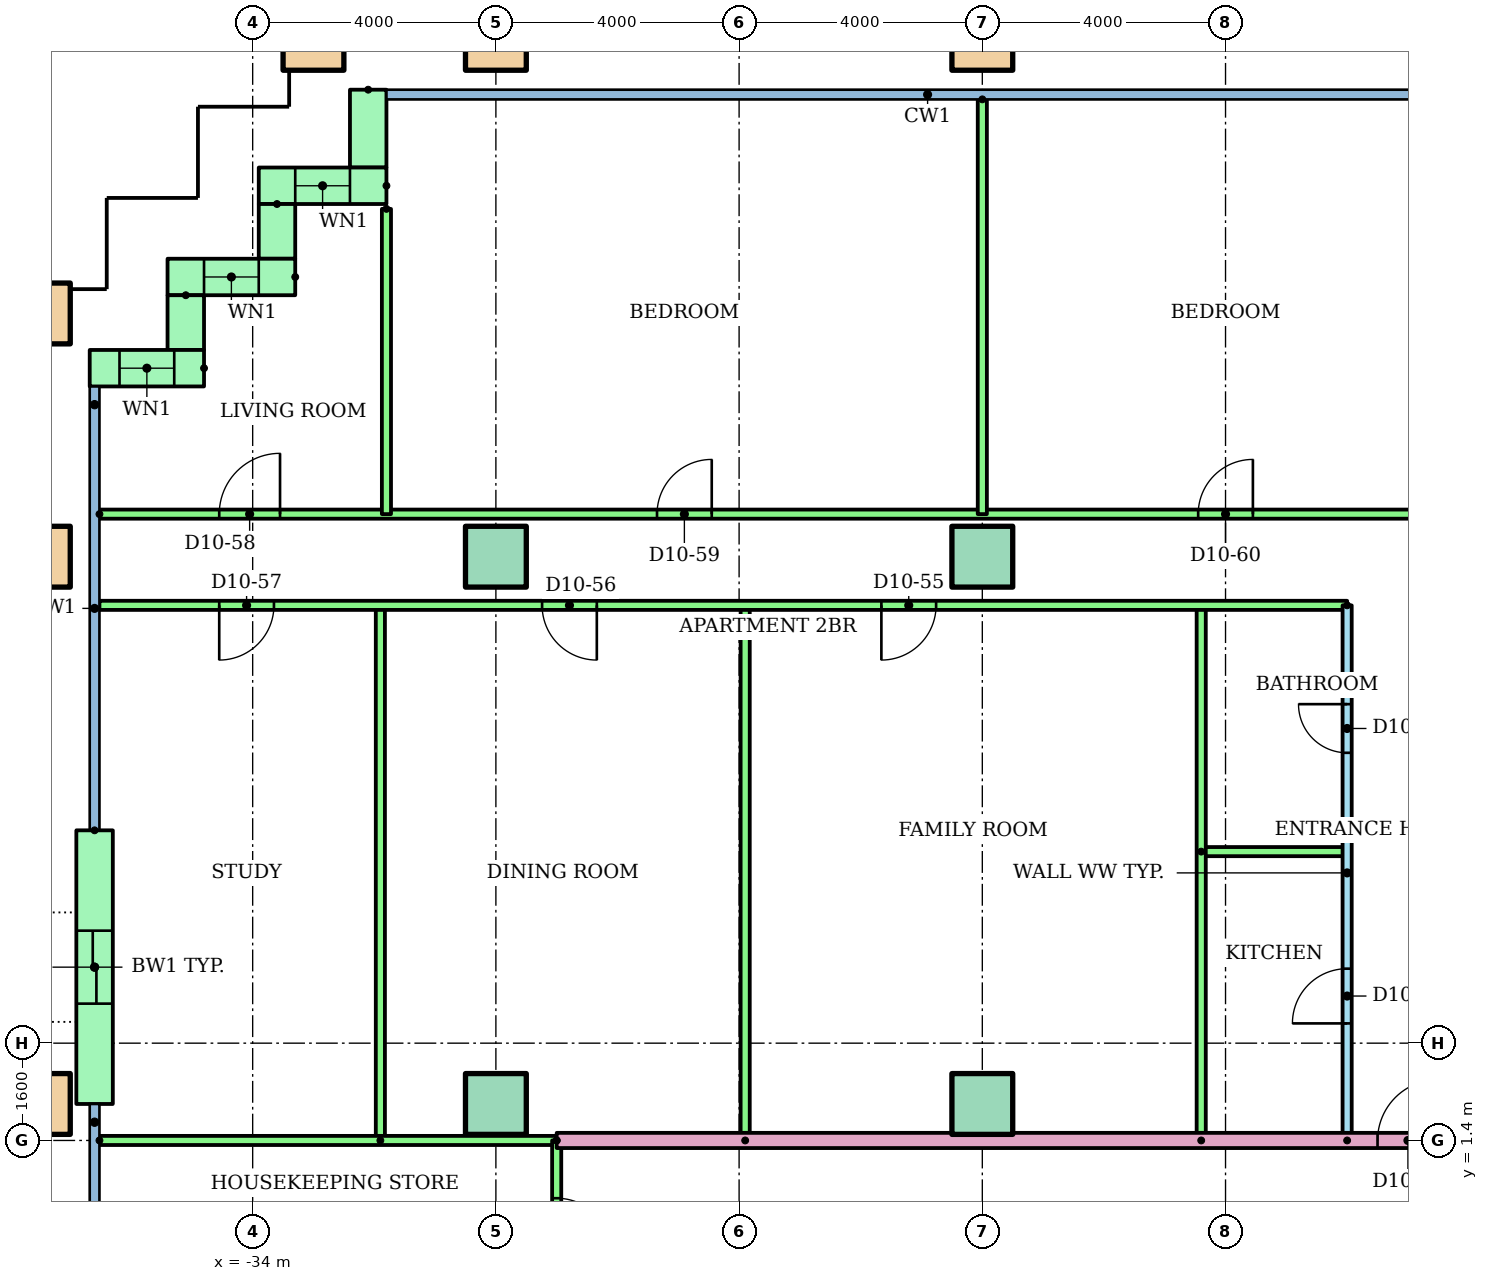
"""IFC4 building model, lengths in metres.
Left out: names, types, materials, properties, quantities, classifications, styles, units other than length and angle.
Written with IfcOpenShell. Run it as: python <this file> out.ifc"""

import sys

from ifc_helpers import new_model, si_unit, direction, frame, frame_2d, origin, origin_2d, place, context, subcontext, project, spatial, rectangle, hollow_rectangle, extrude, element, fill, save


model = new_model("IFC4")
c1 = context("Model", 3, precision=1e-05, world=origin(), true_north=direction((0.0, 1.0)))
c2 = subcontext(c1, "Body", "Model", "MODEL_VIEW")
j1 = project(units=[si_unit("LENGTHUNIT", "METRE"), si_unit("PLANEANGLEUNIT", "RADIAN")], contexts=[c1])
p1 = place(None, origin())
s1 = spatial("IfcSite", under=j1, at=p1, CompositionType="ELEMENT")
p2 = place(p1, origin())
s2 = spatial("IfcBuilding", under=s1, at=p2, CompositionType="ELEMENT")
p3 = place(p2, frame((0.0, 0.0, 41.6)))
s3 = spatial("IfcBuildingStorey", under=s2, at=p3, CompositionType="ELEMENT", Elevation=41.6)
p4 = place(p3, frame((-37.5, 2.0, 0.0)))
e1 = element("IfcColumn", 1, at=p4, inside=s3, PredefinedType="COLUMN", context=c2, shape_type="SweptSolid", body=[
    extrude(hollow_rectangle(XDim=1.0, YDim=1.0, WallThickness=0.05, at=origin_2d()), origin(), (0.0, 0.0, 1.0), 3.2),
])
for number, where in (
    (2, (-30.0, 2.0, 0.0)),
    (3, (-22.0, 2.0, 0.0)),
):
    element("IfcColumn", number, at=place(p3, frame(where)), inside=s3, PredefinedType="COLUMN", context=c2, shape_type="SweptSolid", body=[
        extrude(rectangle(XDim=1.0, YDim=1.0, at=origin_2d()), origin(), (0.0, 0.0, 1.0), 3.2),
    ])
p5 = place(p3, frame((-37.5, 11.0, 0.0)))
e4 = element("IfcColumn", 4, at=p5, inside=s3, PredefinedType="COLUMN", context=c2, shape_type="SweptSolid", body=[
    extrude(hollow_rectangle(XDim=1.0, YDim=1.0, WallThickness=0.05, at=origin_2d()), origin(), (0.0, 0.0, 1.0), 3.2),
])
for number, where in (
    (5, (-30.0, 11.0, 0.0)),
    (6, (-22.0, 11.0, 0.0)),
):
    element("IfcColumn", number, at=place(p3, frame(where)), inside=s3, PredefinedType="COLUMN", context=c2, shape_type="SweptSolid", body=[
        extrude(rectangle(XDim=1.0, YDim=1.0, at=origin_2d()), origin(), (0.0, 0.0, 1.0), 3.2),
    ])
for number, where in (
    (7, (-37.5, 15.0, 0.0)),
    (8, (-33.0, 19.5, 0.0)),
    (9, (-30.0, 19.5, 0.0)),
    (10, (-22.0, 19.5, 0.0)),
):
    element("IfcColumn", number, at=place(p3, frame(where)), inside=s3, PredefinedType="COLUMN", context=c2, shape_type="SweptSolid", body=[
        extrude(hollow_rectangle(XDim=1.0, YDim=1.0, WallThickness=0.05, at=origin_2d()), origin(), (0.0, 0.0, 1.0), 3.2),
    ])
p6 = place(p3, frame((-32.1, 18.68, 0.0), z_axis=(0.0, 0.0, 1.0), x_axis=(0.0, -1.0, 0.0)))
e11 = element("IfcWall", 11, at=p6, inside=s3, PredefinedType="STANDARD", context=c2, shape_type="SweptSolid", body=[
    extrude(rectangle(XDim=1.28, YDim=0.6, at=frame_2d((0.64, 0.0))), origin(), (0.0, 0.0, 1.0), 2.92),
])
p7 = place(p3, frame((-31.8, 17.1, 0.0), z_axis=(0.0, 0.0, 1.0), x_axis=(-1.0, 0.0, 0.0)))
e12 = element("IfcWall", 12, at=p7, inside=s3, PredefinedType="STANDARD", context=c2, shape_type="SweptSolid", body=[
    extrude(rectangle(XDim=2.1, YDim=0.6, at=frame_2d((1.05, 0.0))), origin(), (0.0, 0.0, 1.0), 2.92),
])
p8 = place(p7, frame((0.6, 0.0, 0.9)))
e13 = element("IfcOpeningElement", 13, at=p8, cuts=e12, PredefinedType="OPENING", context=c2, shape_type="SweptSolid", body=[
    extrude(rectangle(XDim=0.9, YDim=1.5, at=frame_2d((0.45, 0.75))), frame((0.0, 0.31, 0.0), z_axis=(0.0, -1.0, 0.0), x_axis=(1.0, 0.0, 0.0)), (0.0, 0.0, 1.0), 0.62),
])
p9 = place(p3, frame((-33.6, 16.8, 0.0), z_axis=(0.0, 0.0, 1.0), x_axis=(0.0, -1.0, 0.0)))
e14 = element("IfcWall", 14, at=p9, inside=s3, PredefinedType="STANDARD", context=c2, shape_type="SweptSolid", body=[
    extrude(rectangle(XDim=0.9, YDim=0.6, at=frame_2d((0.45, 0.0))), origin(), (0.0, 0.0, 1.0), 2.92),
])
p10 = place(p3, frame((-33.3, 15.6, 0.0), z_axis=(0.0, 0.0, 1.0), x_axis=(-1.0, 0.0, 0.0)))
e15 = element("IfcWall", 15, at=p10, inside=s3, PredefinedType="STANDARD", context=c2, shape_type="SweptSolid", body=[
    extrude(rectangle(XDim=2.1, YDim=0.6, at=frame_2d((1.05, 0.0))), origin(), (0.0, 0.0, 1.0), 2.92),
])
p11 = place(p10, frame((0.6, 0.0, 0.9)))
e16 = element("IfcOpeningElement", 16, at=p11, cuts=e15, PredefinedType="OPENING", context=c2, shape_type="SweptSolid", body=[
    extrude(rectangle(XDim=0.9, YDim=1.5, at=frame_2d((0.45, 0.75))), frame((0.0, 0.31, 0.0), z_axis=(0.0, -1.0, 0.0), x_axis=(1.0, 0.0, 0.0)), (0.0, 0.0, 1.0), 0.62),
])
p12 = place(p3, frame((-35.1, 15.3, 0.0), z_axis=(0.0, 0.0, 1.0), x_axis=(0.0, -1.0, 0.0)))
e17 = element("IfcWall", 17, at=p12, inside=s3, PredefinedType="STANDARD", context=c2, shape_type="SweptSolid", body=[
    extrude(rectangle(XDim=0.9, YDim=0.6, at=frame_2d((0.45, 0.0))), origin(), (0.0, 0.0, 1.0), 2.92),
])
p13 = place(p3, frame((-34.8, 14.1, 0.0), z_axis=(0.0, 0.0, 1.0), x_axis=(-1.0, 0.0, 0.0)))
e18 = element("IfcWall", 18, at=p13, inside=s3, PredefinedType="STANDARD", context=c2, shape_type="SweptSolid", body=[
    extrude(rectangle(XDim=1.88, YDim=0.6, at=frame_2d((0.94, 0.0))), origin(), (0.0, 0.0, 1.0), 2.92),
])
p14 = place(p13, frame((0.49, 0.0, 0.9)))
e19 = element("IfcOpeningElement", 19, at=p14, cuts=e18, PredefinedType="OPENING", context=c2, shape_type="SweptSolid", body=[
    extrude(rectangle(XDim=0.9, YDim=1.5, at=frame_2d((0.45, 0.75))), frame((0.0, 0.31, 0.0), z_axis=(0.0, -1.0, 0.0), x_axis=(1.0, 0.0, 0.0)), (0.0, 0.0, 1.0), 0.62),
])
p15 = place(p3, frame((-36.6, 6.5, 0.0), z_axis=(0.0, 0.0, 1.0), x_axis=(0.0, -1.0, 0.0)))
e20 = element("IfcWall", 20, at=p15, inside=s3, PredefinedType="STANDARD", context=c2, shape_type="SweptSolid", body=[
    extrude(rectangle(XDim=4.5, YDim=0.6, at=frame_2d((2.25, 0.0))), origin(), (0.0, 0.0, 1.0), 2.92),
])
p16 = place(p15, frame((1.65, 0.0, 0.0)))
e21 = element("IfcOpeningElement", 21, at=p16, cuts=e20, PredefinedType="OPENING", context=c2, shape_type="SweptSolid", body=[
    extrude(rectangle(XDim=1.2, YDim=2.1, at=frame_2d((0.6, 1.05))), frame((0.0, 0.31, 0.0), z_axis=(0.0, -1.0, 0.0), x_axis=(1.0, 0.0, 0.0)), (0.0, 0.0, 1.0), 0.62),
])
p17 = place(p3, frame((-16.0, 1.4, 0.0), z_axis=(0.0, 0.0, 1.0), x_axis=(0.0, 1.0, 0.0)))
e22 = element("IfcWall", 22, at=p17, inside=s3, PredefinedType="PARTITIONING", context=c2, shape_type="SweptSolid", body=[
    extrude(rectangle(XDim=8.8, YDim=0.15, at=frame_2d((4.4, 0.0))), origin(), (0.0, 0.0, 1.0), 2.4),
])
p18 = place(p17, frame((1.925, 0.0, 0.0)))
e23 = element("IfcOpeningElement", 23, at=p18, cuts=e22, PredefinedType="OPENING", context=c2, shape_type="SweptSolid", body=[
    extrude(rectangle(XDim=0.9, YDim=2.1, at=frame_2d((0.45, 1.05))), frame((0.0, 0.085, 0.0), z_axis=(0.0, -1.0, 0.0), x_axis=(1.0, 0.0, 0.0)), (0.0, 0.0, 1.0), 0.17),
])
p19 = place(p17, frame((6.375, 0.0, 0.0)))
e24 = element("IfcOpeningElement", 24, at=p19, cuts=e22, PredefinedType="OPENING", context=c2, shape_type="SweptSolid", body=[
    extrude(rectangle(XDim=0.8, YDim=2.1, at=frame_2d((0.4, 1.05))), frame((0.0, 0.085, 0.0), z_axis=(0.0, -1.0, 0.0), x_axis=(1.0, 0.0, 0.0)), (0.0, 0.0, 1.0), 0.17),
])
p20 = place(p3, frame((-18.4, 6.15, 0.0)))
e25 = element("IfcWall", 25, at=p20, inside=s3, PredefinedType="PARTITIONING", context=c2, shape_type="SweptSolid", body=[
    extrude(rectangle(XDim=2.4, YDim=0.15, at=frame_2d((1.2, 0.0))), origin(), (0.0, 0.0, 1.0), 2.4),
])
for number, where, z_axis, x_axis in (
    (26, (-18.4, 1.4, 0.0), (0.0, 0.0, 1.0), (0.0, 1.0, 0.0)),
    (27, (-25.9, 1.4, 0.0), (0.0, 0.0, 1.0), (0.0, 1.0, 0.0)),
    (28, (-31.9, 1.4, 0.0), (0.0, 0.0, 1.0), (0.0, 1.0, 0.0)),
):
    element("IfcWall", number, at=place(p3, frame(where, z_axis=z_axis, x_axis=x_axis)), inside=s3, PredefinedType="PARTITIONING", context=c2, shape_type="SweptSolid", body=[
        extrude(rectangle(XDim=8.8, YDim=0.15, at=frame_2d((4.4, 0.0))), origin(), (0.0, 0.0, 1.0), 2.4),
    ])
p21 = place(p3, frame((-16.0, 10.2, 0.0), z_axis=(0.0, 0.0, 1.0), x_axis=(-1.0, 0.0, 0.0)))
e29 = element("IfcWall", 29, at=p21, inside=s3, PredefinedType="PARTITIONING", context=c2, shape_type="SweptSolid", body=[
    extrude(rectangle(XDim=20.52, YDim=0.15, at=frame_2d((10.26, 0.0))), origin(), (0.0, 0.0, 1.0), 2.4),
])
p22 = place(p21, frame((6.76, 0.0, 0.0)))
e30 = element("IfcOpeningElement", 30, at=p22, cuts=e29, PredefinedType="OPENING", context=c2, shape_type="SweptSolid", body=[
    extrude(rectangle(XDim=0.9, YDim=2.1, at=frame_2d((0.45, 1.05))), frame((0.0, 0.085, 0.0), z_axis=(0.0, -1.0, 0.0), x_axis=(1.0, 0.0, 0.0)), (0.0, 0.0, 1.0), 0.17),
])
p23 = place(p21, frame((12.34, 0.0, 0.0)))
e31 = element("IfcOpeningElement", 31, at=p23, cuts=e29, PredefinedType="OPENING", context=c2, shape_type="SweptSolid", body=[
    extrude(rectangle(XDim=0.9, YDim=2.1, at=frame_2d((0.45, 1.05))), frame((0.0, 0.085, 0.0), z_axis=(0.0, -1.0, 0.0), x_axis=(1.0, 0.0, 0.0)), (0.0, 0.0, 1.0), 0.17),
])
p24 = place(p21, frame((17.65, 0.0, 0.0)))
e32 = element("IfcOpeningElement", 32, at=p24, cuts=e29, PredefinedType="OPENING", context=c2, shape_type="SweptSolid", body=[
    extrude(rectangle(XDim=0.9, YDim=2.1, at=frame_2d((0.45, 1.05))), frame((0.0, 0.085, 0.0), z_axis=(0.0, -1.0, 0.0), x_axis=(1.0, 0.0, 0.0)), (0.0, 0.0, 1.0), 0.17),
])
p25 = place(p3, frame((-36.52, 11.7, 0.0)))
e33 = element("IfcWall", 33, at=p25, inside=s3, PredefinedType="PARTITIONING", context=c2, shape_type="SweptSolid", body=[
    extrude(rectangle(XDim=22.52, YDim=0.15, at=frame_2d((11.26, 0.0))), origin(), (0.0, 0.0, 1.0), 2.4),
])
p26 = place(p25, frame((1.97, 0.0, 0.0)))
e34 = element("IfcOpeningElement", 34, at=p26, cuts=e33, PredefinedType="OPENING", context=c2, shape_type="SweptSolid", body=[
    extrude(rectangle(XDim=1.0, YDim=2.1, at=frame_2d((0.5, 1.05))), frame((0.0, 0.085, 0.0), z_axis=(0.0, -1.0, 0.0), x_axis=(1.0, 0.0, 0.0)), (0.0, 0.0, 1.0), 0.17),
])
p27 = place(p25, frame((9.17, 0.0, 0.0)))
e35 = element("IfcOpeningElement", 35, at=p27, cuts=e33, PredefinedType="OPENING", context=c2, shape_type="SweptSolid", body=[
    extrude(rectangle(XDim=0.9, YDim=2.1, at=frame_2d((0.45, 1.05))), frame((0.0, 0.085, 0.0), z_axis=(0.0, -1.0, 0.0), x_axis=(1.0, 0.0, 0.0)), (0.0, 0.0, 1.0), 0.17),
])
p28 = place(p25, frame((18.07, 0.0, 0.0)))
e36 = element("IfcOpeningElement", 36, at=p28, cuts=e33, PredefinedType="OPENING", context=c2, shape_type="SweptSolid", body=[
    extrude(rectangle(XDim=0.9, YDim=2.1, at=frame_2d((0.45, 1.05))), frame((0.0, 0.085, 0.0), z_axis=(0.0, -1.0, 0.0), x_axis=(1.0, 0.0, 0.0)), (0.0, 0.0, 1.0), 0.17),
])
p29 = place(p3, frame((-31.8, 16.72, 0.0), z_axis=(0.0, 0.0, 1.0), x_axis=(0.0, -1.0, 0.0)))
e37 = element("IfcWall", 37, at=p29, inside=s3, PredefinedType="PARTITIONING", context=c2, shape_type="SweptSolid", body=[
    extrude(rectangle(XDim=5.02, YDim=0.15, at=frame_2d((2.51, 0.0))), origin(), (0.0, 0.0, 1.0), 2.4),
])
p30 = place(p3, frame((-22.0, 18.521, 0.0), z_axis=(0.0, 0.0, 1.0), x_axis=(0.0, -1.0, 0.0)))
e38 = element("IfcWall", 38, at=p30, inside=s3, PredefinedType="PARTITIONING", context=c2, shape_type="SweptSolid", body=[
    extrude(rectangle(XDim=6.821, YDim=0.15, at=frame_2d((3.411, 0.0))), origin(), (0.0, 0.0, 1.0), 2.4),
])
p31 = place(p3, frame((-29.0, 1.4, 0.0)))
e39 = element("IfcWall", 39, at=p31, inside=s3, PredefinedType="PARTITIONING", context=c2, shape_type="SweptSolid", body=[
    extrude(rectangle(XDim=15.0, YDim=0.25, at=frame_2d((7.5, 0.0))), origin(), (0.0, 0.0, 1.0), 2.4),
])
p32 = place(p31, frame((13.5, 0.0, 0.0)))
e40 = element("IfcOpeningElement", 40, at=p32, cuts=e39, PredefinedType="OPENING", context=c2, shape_type="SweptSolid", body=[
    extrude(rectangle(XDim=1.0, YDim=2.1, at=frame_2d((0.5, 1.05))), frame((0.0, 0.135, 0.0), z_axis=(0.0, -1.0, 0.0), x_axis=(1.0, 0.0, 0.0)), (0.0, 0.0, 1.0), 0.27),
])
p33 = place(p3, frame((-36.52, 1.4, 0.0)))
e41 = element("IfcWall", 41, at=p33, inside=s3, PredefinedType="PARTITIONING", context=c2, shape_type="SweptSolid", body=[
    extrude(rectangle(XDim=7.52, YDim=0.15, at=frame_2d((3.76, 0.0))), origin(), (0.0, 0.0, 1.0), 2.4),
])
p34 = place(p3, frame((-29.0, 1.4, 0.0), z_axis=(0.0, 0.0, 1.0), x_axis=(0.0, -1.0, 0.0)))
e42 = element("IfcWall", 42, at=p34, inside=s3, PredefinedType="PARTITIONING", context=c2, shape_type="SweptSolid", body=[
    extrude(rectangle(XDim=2.8, YDim=0.15, at=frame_2d((1.4, 0.0))), origin(), (0.0, 0.0, 1.0), 2.4),
])
p35 = place(p34, frame((0.95, 0.0, 0.0)))
e43 = element("IfcOpeningElement", 43, at=p35, cuts=e42, PredefinedType="OPENING", context=c2, shape_type="SweptSolid", body=[
    extrude(rectangle(XDim=0.9, YDim=2.1, at=frame_2d((0.45, 1.05))), frame((0.0, 0.085, 0.0), z_axis=(0.0, -1.0, 0.0), x_axis=(1.0, 0.0, 0.0)), (0.0, 0.0, 1.0), 0.17),
])
p36 = place(p8, origin())
e44 = element("IfcWindow", 44, at=p36, inside=s3, PartitioningType="SINGLE_PANEL", PredefinedType="WINDOW", context=c2, shape_type="SweptSolid", body=[
    extrude(rectangle(XDim=0.9, YDim=1.5, at=frame_2d((0.45, 0.75))), frame((0.0, 0.03, 0.0), z_axis=(0.0, -1.0, 0.0), x_axis=(1.0, 0.0, 0.0)), (0.0, 0.0, 1.0), 0.06),
])
fill(e13, e44)
p37 = place(p11, origin())
e45 = element("IfcWindow", 45, at=p37, inside=s3, PartitioningType="SINGLE_PANEL", PredefinedType="WINDOW", context=c2, shape_type="SweptSolid", body=[
    extrude(rectangle(XDim=0.9, YDim=1.5, at=frame_2d((0.45, 0.75))), frame((0.0, 0.03, 0.0), z_axis=(0.0, -1.0, 0.0), x_axis=(1.0, 0.0, 0.0)), (0.0, 0.0, 1.0), 0.06),
])
fill(e16, e45)
p38 = place(p14, origin())
e46 = element("IfcWindow", 46, at=p38, inside=s3, PartitioningType="SINGLE_PANEL", PredefinedType="WINDOW", context=c2, shape_type="SweptSolid", body=[
    extrude(rectangle(XDim=0.9, YDim=1.5, at=frame_2d((0.45, 0.75))), frame((0.0, 0.03, 0.0), z_axis=(0.0, -1.0, 0.0), x_axis=(1.0, 0.0, 0.0)), (0.0, 0.0, 1.0), 0.06),
])
fill(e19, e46)
p39 = place(p18, origin())
e47 = element("IfcDoor", 47, at=p39, inside=s3, OperationType="SINGLE_SWING_LEFT", PredefinedType="DOOR", context=c2, shape_type="SweptSolid", body=[
    extrude(rectangle(XDim=0.9, YDim=2.1, at=frame_2d((0.45, 1.05))), frame((0.0, 0.025, 0.0), z_axis=(0.0, -1.0, 0.0), x_axis=(1.0, 0.0, 0.0)), (0.0, 0.0, 1.0), 0.05),
])
fill(e23, e47)
p40 = place(p19, origin())
e48 = element("IfcDoor", 48, at=p40, inside=s3, OperationType="SINGLE_SWING_RIGHT", PredefinedType="DOOR", context=c2, shape_type="SweptSolid", body=[
    extrude(rectangle(XDim=0.8, YDim=2.1, at=frame_2d((0.4, 1.05))), frame((0.0, 0.025, 0.0), z_axis=(0.0, -1.0, 0.0), x_axis=(1.0, 0.0, 0.0)), (0.0, 0.0, 1.0), 0.05),
])
fill(e24, e48)
p41 = place(p22, origin())
e49 = element("IfcDoor", 49, at=p41, inside=s3, OperationType="SINGLE_SWING_RIGHT", PredefinedType="DOOR", context=c2, shape_type="SweptSolid", body=[
    extrude(rectangle(XDim=0.9, YDim=2.1, at=frame_2d((0.45, 1.05))), frame((0.0, 0.025, 0.0), z_axis=(0.0, -1.0, 0.0), x_axis=(1.0, 0.0, 0.0)), (0.0, 0.0, 1.0), 0.05),
])
fill(e30, e49)
p42 = place(p23, origin())
e50 = element("IfcDoor", 50, at=p42, inside=s3, OperationType="SINGLE_SWING_LEFT", PredefinedType="DOOR", context=c2, shape_type="SweptSolid", body=[
    extrude(rectangle(XDim=0.9, YDim=2.1, at=frame_2d((0.45, 1.05))), frame((0.0, 0.025, 0.0), z_axis=(0.0, -1.0, 0.0), x_axis=(1.0, 0.0, 0.0)), (0.0, 0.0, 1.0), 0.05),
])
fill(e31, e50)
p43 = place(p24, origin())
e51 = element("IfcDoor", 51, at=p43, inside=s3, OperationType="SINGLE_SWING_RIGHT", PredefinedType="DOOR", context=c2, shape_type="SweptSolid", body=[
    extrude(rectangle(XDim=0.9, YDim=2.1, at=frame_2d((0.45, 1.05))), frame((0.0, 0.025, 0.0), z_axis=(0.0, -1.0, 0.0), x_axis=(1.0, 0.0, 0.0)), (0.0, 0.0, 1.0), 0.05),
])
fill(e32, e51)
p44 = place(p26, origin())
e52 = element("IfcDoor", 52, at=p44, inside=s3, OperationType="SINGLE_SWING_RIGHT", PredefinedType="DOOR", context=c2, shape_type="SweptSolid", body=[
    extrude(rectangle(XDim=1.0, YDim=2.1, at=frame_2d((0.5, 1.05))), frame((0.0, 0.025, 0.0), z_axis=(0.0, -1.0, 0.0), x_axis=(1.0, 0.0, 0.0)), (0.0, 0.0, 1.0), 0.05),
])
fill(e34, e52)
p45 = place(p27, origin())
e53 = element("IfcDoor", 53, at=p45, inside=s3, OperationType="SINGLE_SWING_RIGHT", PredefinedType="DOOR", context=c2, shape_type="SweptSolid", body=[
    extrude(rectangle(XDim=0.9, YDim=2.1, at=frame_2d((0.45, 1.05))), frame((0.0, 0.025, 0.0), z_axis=(0.0, -1.0, 0.0), x_axis=(1.0, 0.0, 0.0)), (0.0, 0.0, 1.0), 0.05),
])
fill(e35, e53)
p46 = place(p28, origin())
e54 = element("IfcDoor", 54, at=p46, inside=s3, OperationType="SINGLE_SWING_RIGHT", PredefinedType="DOOR", context=c2, shape_type="SweptSolid", body=[
    extrude(rectangle(XDim=0.9, YDim=2.1, at=frame_2d((0.45, 1.05))), frame((0.0, 0.025, 0.0), z_axis=(0.0, -1.0, 0.0), x_axis=(1.0, 0.0, 0.0)), (0.0, 0.0, 1.0), 0.05),
])
fill(e36, e54)
p47 = place(p32, origin())
e55 = element("IfcDoor", 55, at=p47, inside=s3, OperationType="SINGLE_SWING_RIGHT", PredefinedType="DOOR", context=c2, shape_type="SweptSolid", body=[
    extrude(rectangle(XDim=1.0, YDim=2.1, at=frame_2d((0.5, 1.05))), frame((0.0, 0.025, 0.0), z_axis=(0.0, -1.0, 0.0), x_axis=(1.0, 0.0, 0.0)), (0.0, 0.0, 1.0), 0.05),
])
fill(e40, e55)
p48 = place(p35, origin())
e56 = element("IfcDoor", 56, at=p48, inside=s3, OperationType="SINGLE_SWING_RIGHT", PredefinedType="DOOR", context=c2, shape_type="SweptSolid", body=[
    extrude(rectangle(XDim=0.9, YDim=2.1, at=frame_2d((0.45, 1.05))), frame((0.0, 0.025, 0.0), z_axis=(0.0, -1.0, 0.0), x_axis=(1.0, 0.0, 0.0)), (0.0, 0.0, 1.0), 0.05),
])
fill(e43, e56)
p49 = place(p16, origin())
e57 = element("IfcDoor", 57, at=p49, inside=s3, OperationType="SLIDING_TO_LEFT", PredefinedType="DOOR", context=c2, shape_type="SweptSolid", body=[
    extrude(rectangle(XDim=1.2, YDim=2.1, at=frame_2d((0.6, 1.05))), frame((0.0, 0.025, 0.0), z_axis=(0.0, -1.0, 0.0), x_axis=(1.0, 0.0, 0.0)), (0.0, 0.0, 1.0), 0.05),
])
fill(e21, e57)
save(model, sys.argv[1])
